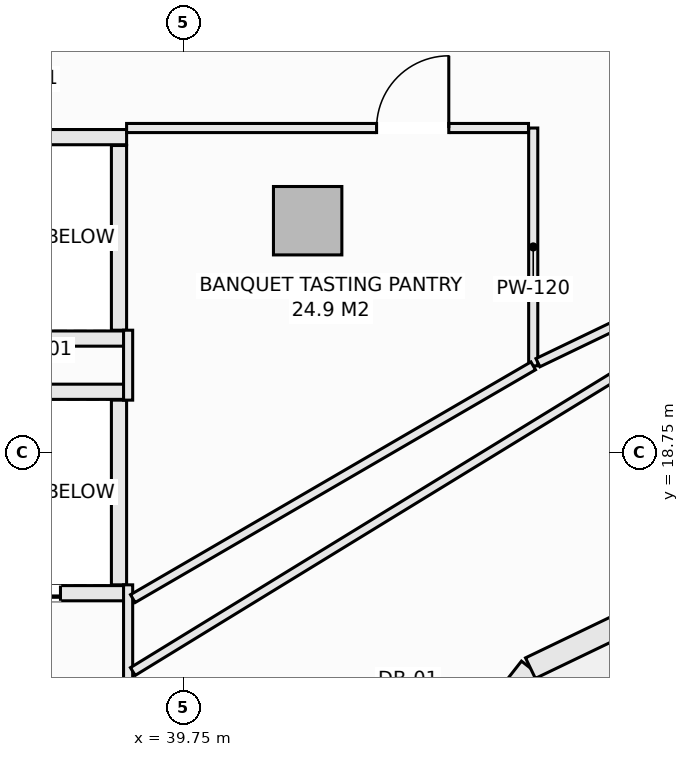
"""IFC4 building model, lengths in metres.
Left out: names, types, materials, properties, quantities, classifications, styles, units other than length and angle.
Written with IfcOpenShell. Run it as: python <this file> out.ifc"""

import sys

from ifc_helpers import new_model, si_unit, direction, frame, frame_2d, origin, origin_2d, place, context, subcontext, project, spatial, rectangle, extrude, element, fill, save


model = new_model("IFC4")
c1 = context("Model", 3, precision=1e-05, world=origin(), true_north=direction((0.0, 1.0)))
c2 = subcontext(c1, "Body", "Model", "MODEL_VIEW")
j1 = project(units=[si_unit("LENGTHUNIT", "METRE"), si_unit("PLANEANGLEUNIT", "RADIAN")], contexts=[c1])
p1 = place(None, origin())
s1 = spatial("IfcSite", under=j1, at=p1, CompositionType="ELEMENT")
p2 = place(p1, origin())
s2 = spatial("IfcBuilding", under=s1, at=p2, CompositionType="ELEMENT")
p3 = place(p2, frame((0.0, 0.0, 146.1)))
s3 = spatial("IfcBuildingStorey", under=s2, at=p3, CompositionType="ELEMENT", Elevation=146.1)
p4 = place(p3, frame((41.382, 21.801, -0.27), z_axis=(0.0, 0.0, 1.0), x_axis=(1.0, 0.0, 0.0)))
e1 = element("IfcColumn", 1, at=p4, inside=s3, PredefinedType="COLUMN", context=c2, shape_type="SweptSolid", body=[
    extrude(rectangle(XDim=0.9, YDim=0.9, at=origin_2d()), origin(), (0.0, 0.0, 1.0), 3.4),
])
p5 = place(p3, frame((41.094, 11.801, 0.0), z_axis=(0.0, 0.0, 1.0), x_axis=(0.616429245738, 0.787410302828, 0.0)))
e2 = element("IfcWall", 2, at=p5, inside=s3, PredefinedType="SOLIDWALL", context=c2, shape_type="SweptSolid", body=[
    extrude(rectangle(XDim=5.223, YDim=0.3, at=frame_2d((2.612, 0.0))), origin(), (0.0, 0.0, 1.0), 2.653),
])
p6 = place(p5, frame((1.712, 0.0, 0.0)))
e3 = element("IfcOpeningElement", 3, at=p6, cuts=e2, PredefinedType="OPENING", context=c2, shape_type="SweptSolid", body=[
    extrude(rectangle(XDim=1.8, YDim=2.25, at=frame_2d((0.9, 1.125))), frame((0.0, 0.16, 0.0), z_axis=(0.0, -1.0, 0.0), x_axis=(1.0, 0.0, 0.0)), (0.0, 0.0, 1.0), 0.32),
])
p7 = place(p3, frame((44.313, 15.914, 0.0), z_axis=(0.0, 0.0, 1.0), x_axis=(0.901353070301, 0.433085029363, 0.0)))
e4 = element("IfcWall", 4, at=p7, inside=s3, PredefinedType="SOLIDWALL", context=c2, shape_type="SweptSolid", body=[
    extrude(rectangle(XDim=5.336, YDim=0.3, at=frame_2d((2.668, 0.0))), origin(), (0.0, 0.0, 1.0), 2.653),
])
p8 = place(p7, frame((1.618, 0.0, 0.74)))
e5 = element("IfcOpeningElement", 5, at=p8, cuts=e4, PredefinedType="OPENING", context=c2, shape_type="SweptSolid", body=[
    extrude(rectangle(XDim=2.1, YDim=1.7, at=frame_2d((1.05, 0.85))), frame((0.0, 0.16, 0.0), z_axis=(0.0, -1.0, 0.0), x_axis=(1.0, 0.0, 0.0)), (0.0, 0.0, 1.0), 0.32),
])
p9 = place(p3, frame((36.75, 19.55, 0.0), z_axis=(0.0, 0.0, 1.0), x_axis=(1.0, 0.0, 0.0)))
e6 = element("IfcWall", 6, at=p9, inside=s3, PredefinedType="SOLIDWALL", context=c2, shape_type="SweptSolid", body=[
    extrude(rectangle(XDim=2.25, YDim=0.2, at=frame_2d((1.125, 0.0))), origin(), (0.0, 0.0, 1.0), 3.13),
])
p10 = place(p3, frame((36.75, 16.9, 0.0), z_axis=(0.0, 0.0, 1.0), x_axis=(1.0, 0.0, 0.0)))
e7 = element("IfcWall", 7, at=p10, inside=s3, PredefinedType="SOLIDWALL", context=c2, shape_type="SweptSolid", body=[
    extrude(rectangle(XDim=2.25, YDim=0.2, at=frame_2d((1.125, 0.0))), origin(), (0.0, 0.0, 1.0), 3.13),
])
p11 = place(p10, frame((0.28, 0.0, 0.0)))
e8 = element("IfcOpeningElement", 8, at=p11, cuts=e7, PredefinedType="OPENING", context=c2, shape_type="SweptSolid", body=[
    extrude(rectangle(XDim=1.1, YDim=2.2, at=frame_2d((0.55, 1.1))), frame((0.0, 0.11, 0.0), z_axis=(0.0, -1.0, 0.0), x_axis=(1.0, 0.0, 0.0)), (0.0, 0.0, 1.0), 0.22),
])
p12 = place(p3, frame((38.9, 17.01, 0.0), z_axis=(0.0, 0.0, 1.0), x_axis=(0.0, 1.0, 0.0)))
e9 = element("IfcWall", 9, at=p12, inside=s3, PredefinedType="SOLIDWALL", context=c2, shape_type="SweptSolid", body=[
    extrude(rectangle(XDim=2.43, YDim=0.2, at=frame_2d((1.215, 0.0))), origin(), (0.0, 0.0, 1.0), 3.13),
])
for number, where, z_axis, x_axis in (
    (10, (36.75, 22.9, 0.0), (0.0, 0.0, 1.0), (1.0, 0.0, 0.0)),
    (11, (36.75, 20.25, 0.0), (0.0, 0.0, 1.0), (1.0, 0.0, 0.0)),
):
    element("IfcWall", number, at=place(p3, frame(where, z_axis=z_axis, x_axis=x_axis)), inside=s3, PredefinedType="SOLIDWALL", context=c2, shape_type="SweptSolid", body=[
        extrude(rectangle(XDim=2.25, YDim=0.2, at=frame_2d((1.125, 0.0))), origin(), (0.0, 0.0, 1.0), 3.13),
    ])
p13 = place(p3, frame((38.9, 20.36, 0.0), z_axis=(0.0, 0.0, 1.0), x_axis=(0.0, 1.0, 0.0)))
e12 = element("IfcWall", 12, at=p13, inside=s3, PredefinedType="SOLIDWALL", context=c2, shape_type="SweptSolid", body=[
    extrude(rectangle(XDim=2.43, YDim=0.2, at=frame_2d((1.215, 0.0))), origin(), (0.0, 0.0, 1.0), 3.13),
])
p14 = place(p3, frame((39.02, 15.65, 0.0), z_axis=(0.0, 0.0, 1.0), x_axis=(0.0, 1.0, 0.0)))
e13 = element("IfcWall", 13, at=p14, inside=s3, PredefinedType="PARTITIONING", context=c2, shape_type="SweptSolid", body=[
    extrude(rectangle(XDim=1.36, YDim=0.12, at=frame_2d((0.68, 0.0))), origin(), (0.0, 0.0, 1.0), 2.505),
])
p15 = place(p3, frame((39.02, 19.44, 0.0), z_axis=(0.0, 0.0, 1.0), x_axis=(0.0, 1.0, 0.0)))
e14 = element("IfcWall", 14, at=p15, inside=s3, PredefinedType="PARTITIONING", context=c2, shape_type="SweptSolid", body=[
    extrude(rectangle(XDim=0.92, YDim=0.12, at=frame_2d((0.46, 0.0))), origin(), (0.0, 0.0, 1.0), 3.13),
])
p16 = place(p3, frame((44.35, 19.891, 0.0), z_axis=(0.0, 0.0, 1.0), x_axis=(0.0, 1.0, 0.0)))
e15 = element("IfcWall", 15, at=p16, inside=s3, PredefinedType="PARTITIONING", context=c2, shape_type="SweptSolid", body=[
    extrude(rectangle(XDim=3.129, YDim=0.12, at=frame_2d((1.564, 0.0))), origin(), (0.0, 0.0, 1.0), 3.13),
])
p17 = place(p3, frame((44.412, 19.933, 0.0), z_axis=(0.0, 0.0, 1.0), x_axis=(0.90128266231, 0.433231534656, 0.0)))
e16 = element("IfcWall", 16, at=p17, inside=s3, PredefinedType="PARTITIONING", context=c2, shape_type="SweptSolid", body=[
    extrude(rectangle(XDim=2.062, YDim=0.12, at=frame_2d((1.031, 0.0))), origin(), (0.0, 0.0, 1.0), 3.13),
])
p18 = place(p3, frame((39.0, 23.02, 0.0), z_axis=(0.0, 0.0, 1.0), x_axis=(1.0, 0.0, 0.0)))
e17 = element("IfcWall", 17, at=p18, inside=s3, PredefinedType="PARTITIONING", context=c2, shape_type="SweptSolid", body=[
    extrude(rectangle(XDim=5.288, YDim=0.12, at=frame_2d((2.644, 0.0))), origin(), (0.0, 0.0, 1.0), 3.13),
])
p19 = place(p18, frame((3.289, 0.0, 0.0)))
e18 = element("IfcOpeningElement", 18, at=p19, cuts=e17, PredefinedType="OPENING", context=c2, shape_type="SweptSolid", body=[
    extrude(rectangle(XDim=0.95, YDim=2.1, at=frame_2d((0.475, 1.05))), frame((0.0, 0.07, 0.0), z_axis=(0.0, -1.0, 0.0), x_axis=(1.0, 0.0, 0.0)), (0.0, 0.0, 1.0), 0.14),
])
p20 = place(p3, frame((39.082, 15.87, 0.0), z_axis=(0.0, 0.0, 1.0), x_axis=(0.852607858044, 0.522551280165, 0.0)))
e19 = element("IfcWall", 19, at=p20, inside=s3, PredefinedType="PARTITIONING", context=c2, shape_type="SweptSolid", body=[
    extrude(rectangle(XDim=14.342, YDim=0.12, at=frame_2d((7.171, 0.0))), origin(), (0.0, 0.0, 1.0), 2.505),
])
p21 = place(p3, frame((39.082, 16.829, 0.0), z_axis=(0.0, 0.0, 1.0), x_axis=(0.864565483681, 0.502520173155, 0.0)))
e20 = element("IfcWall", 20, at=p21, inside=s3, PredefinedType="PARTITIONING", context=c2, shape_type="SweptSolid", body=[
    extrude(rectangle(XDim=6.093, YDim=0.12, at=frame_2d((3.047, 0.0))), origin(), (0.0, 0.0, 1.0), 2.505),
])
p22 = place(p11, origin())
e21 = element("IfcDoor", 21, at=p22, inside=s3, OperationType="SLIDING_TO_LEFT", PredefinedType="DOOR", context=c2, shape_type="SweptSolid", body=[
    extrude(rectangle(XDim=1.1, YDim=2.2, at=frame_2d((0.55, 1.1))), frame((0.0, 0.025, 0.0), z_axis=(0.0, -1.0, 0.0), x_axis=(1.0, 0.0, 0.0)), (0.0, 0.0, 1.0), 0.05),
])
fill(e8, e21)
p23 = place(p19, origin())
e22 = element("IfcDoor", 22, at=p23, inside=s3, OperationType="SINGLE_SWING_RIGHT", PredefinedType="DOOR", context=c2, shape_type="SweptSolid", body=[
    extrude(rectangle(XDim=0.95, YDim=2.1, at=frame_2d((0.475, 1.05))), frame((0.0, 0.025, 0.0), z_axis=(0.0, -1.0, 0.0), x_axis=(1.0, 0.0, 0.0)), (0.0, 0.0, 1.0), 0.05),
])
fill(e18, e22)
save(model, sys.argv[1])
